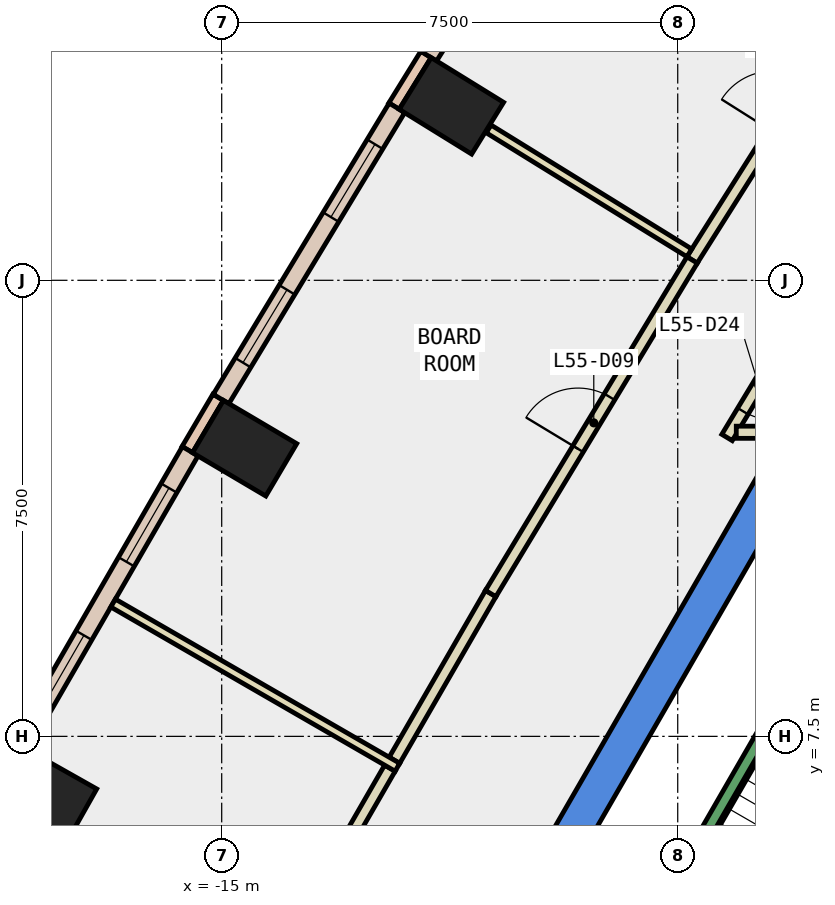
"""IFC4 building model, lengths in metres.
Left out: names, types, materials, properties, quantities, classifications, styles, units other than length and angle.
Written with IfcOpenShell. Run it as: python <this file> out.ifc"""

import sys

from ifc_helpers import new_model, si_unit, direction, frame, frame_2d, origin, origin_2d, place, context, subcontext, project, spatial, polyline, rectangle, outline, extrude, element, fill, save


model = new_model("IFC4")
c1 = context("Model", 3, precision=1e-05, world=origin(), true_north=direction((0.0, 1.0)))
c2 = subcontext(c1, "Body", "Model", "MODEL_VIEW")
j1 = project(units=[si_unit("LENGTHUNIT", "METRE"), si_unit("PLANEANGLEUNIT", "RADIAN")], contexts=[c1])
p1 = place(None, origin())
s1 = spatial("IfcSite", under=j1, at=p1, CompositionType="ELEMENT")
p2 = place(p1, origin())
s2 = spatial("IfcBuilding", under=s1, at=p2, CompositionType="ELEMENT")
p3 = place(p2, frame((0.0, 0.0, 245.0)))
s3 = spatial("IfcBuildingStorey", under=s2, at=p3, CompositionType="ELEMENT", Elevation=245.0)
for number, where, z_axis, x_axis in (
    (1, (-11.222, 17.869, -0.34), (0.0, 0.0, 1.0), (0.526, 0.851, 0.0)),
    (2, (-14.623, 12.239, -0.34), (0.0, 0.0, 1.0), (0.509, 0.861, 0.0)),
    (3, (-17.911, 6.544, -0.34), (0.0, 0.0, 1.0), (0.491, 0.871, 0.0)),
):
    element("IfcColumn", number, at=place(p3, frame(where, z_axis=z_axis, x_axis=x_axis)), inside=s3, PredefinedType="COLUMN", context=c2, shape_type="SweptSolid", body=[
        extrude(rectangle(XDim=1.0, YDim=1.4, at=origin_2d()), origin(), (0.0, 0.0, 1.0), 3.6),
    ])
p4 = place(p3, frame((0.0, 0.0, -0.34)))
e4 = element("IfcWall", 4, at=p4, inside=s3, PredefinedType="SHEAR", context=c2, shape_type="SweptSolid", body=[
    extrude(outline(polyline([(-10.535, 4.253), (-10.015, 3.953), (-5.427, 11.9), (-5.774, 12.5), (-10.535, 4.253)])), origin(), (0.0, 0.0, 1.0), 3.6),
])
p5 = place(p3, frame((-11.64, 18.715, 0.0), z_axis=(0.0, 0.0, 1.0), x_axis=(-0.525825307325, -0.850592585306, 0.0)))
e5 = element("IfcWall", 5, at=p5, inside=s3, PredefinedType="STANDARD", context=c2, shape_type="SweptSolid", body=[
    extrude(rectangle(XDim=1.0, YDim=0.2, at=frame_2d((0.5, 0.0))), origin(), (0.0, 0.0, 1.0), 3.26),
])
p6 = place(p3, frame((-15.058, 13.077, 0.0), z_axis=(0.0, 0.0, 1.0), x_axis=(-0.508087253435, -0.86130560366, 0.0)))
e6 = element("IfcWall", 6, at=p6, inside=s3, PredefinedType="STANDARD", context=c2, shape_type="SweptSolid", body=[
    extrude(rectangle(XDim=1.0, YDim=0.2, at=frame_2d((0.5, 0.0))), origin(), (0.0, 0.0, 1.0), 3.26),
])
p7 = place(p3, frame((-8.618, 23.396, 0.0), z_axis=(0.0, 0.0, 1.0), x_axis=(-0.534088597203, -0.845428512849, 0.0)))
e7 = element("IfcWall", 7, at=p7, inside=s3, PredefinedType="STANDARD", context=c2, shape_type="SweptSolid", body=[
    extrude(rectangle(XDim=5.572, YDim=0.3, at=frame_2d((2.786, 0.0))), origin(), (0.0, 0.0, 1.0), 3.26),
])
p8 = place(p7, frame((0.693, 0.0, 0.9)))
e8 = element("IfcOpeningElement", 8, at=p8, cuts=e7, PredefinedType="OPENING", context=c2, shape_type="SweptSolid", body=[
    extrude(rectangle(XDim=1.4, YDim=2.0, at=frame_2d((0.7, 1.0))), frame((0.0, 0.16, 0.0), z_axis=(0.0, -1.0, 0.0), x_axis=(1.0, 0.0, 0.0)), (0.0, 0.0, 1.0), 0.32),
])
p9 = place(p7, frame((3.479, 0.0, 0.9)))
e9 = element("IfcOpeningElement", 9, at=p9, cuts=e7, PredefinedType="OPENING", context=c2, shape_type="SweptSolid", body=[
    extrude(rectangle(XDim=1.4, YDim=2.0, at=frame_2d((0.7, 1.0))), frame((0.0, 0.16, 0.0), z_axis=(0.0, -1.0, 0.0), x_axis=(1.0, 0.0, 0.0)), (0.0, 0.0, 1.0), 0.32),
])
p10 = place(p3, frame((-12.118, 17.836, 0.0), z_axis=(0.0, 0.0, 1.0), x_axis=(-0.517169592475, -0.855882943293, 0.0)))
e10 = element("IfcWall", 10, at=p10, inside=s3, PredefinedType="STANDARD", context=c2, shape_type="SweptSolid", body=[
    extrude(rectangle(XDim=5.594, YDim=0.3, at=frame_2d((2.797, 0.0))), origin(), (0.0, 0.0, 1.0), 3.26),
])
p11 = place(p10, frame((0.699, 0.0, 0.9)))
e11 = element("IfcOpeningElement", 11, at=p11, cuts=e10, PredefinedType="OPENING", context=c2, shape_type="SweptSolid", body=[
    extrude(rectangle(XDim=1.4, YDim=2.0, at=frame_2d((0.7, 1.0))), frame((0.0, 0.16, 0.0), z_axis=(0.0, -1.0, 0.0), x_axis=(1.0, 0.0, 0.0)), (0.0, 0.0, 1.0), 0.32),
])
p12 = place(p10, frame((3.496, 0.0, 0.9)))
e12 = element("IfcOpeningElement", 12, at=p12, cuts=e10, PredefinedType="OPENING", context=c2, shape_type="SweptSolid", body=[
    extrude(rectangle(XDim=1.4, YDim=2.0, at=frame_2d((0.7, 1.0))), frame((0.0, 0.16, 0.0), z_axis=(0.0, -1.0, 0.0), x_axis=(1.0, 0.0, 0.0)), (0.0, 0.0, 1.0), 0.32),
])
p13 = place(p3, frame((-15.518, 12.189, 0.0), z_axis=(0.0, 0.0, 1.0), x_axis=(-0.49995037644, -0.866054052065, 0.0)))
e13 = element("IfcWall", 13, at=p13, inside=s3, PredefinedType="STANDARD", context=c2, shape_type="SweptSolid", body=[
    extrude(rectangle(XDim=5.594, YDim=0.3, at=frame_2d((2.797, 0.0))), origin(), (0.0, 0.0, 1.0), 3.26),
])
p14 = place(p13, frame((0.699, 0.0, 0.9)))
e14 = element("IfcOpeningElement", 14, at=p14, cuts=e13, PredefinedType="OPENING", context=c2, shape_type="SweptSolid", body=[
    extrude(rectangle(XDim=1.4, YDim=2.0, at=frame_2d((0.7, 1.0))), frame((0.0, 0.16, 0.0), z_axis=(0.0, -1.0, 0.0), x_axis=(1.0, 0.0, 0.0)), (0.0, 0.0, 1.0), 0.32),
])
p15 = place(p13, frame((3.496, 0.0, 0.9)))
e15 = element("IfcOpeningElement", 15, at=p15, cuts=e13, PredefinedType="OPENING", context=c2, shape_type="SweptSolid", body=[
    extrude(rectangle(XDim=1.4, YDim=2.0, at=frame_2d((0.7, 1.0))), frame((0.0, 0.16, 0.0), z_axis=(0.0, -1.0, 0.0), x_axis=(1.0, 0.0, 0.0)), (0.0, 0.0, 1.0), 0.32),
])
p16 = place(p3, frame((-5.65, 14.136, 0.0), z_axis=(0.0, 0.0, 1.0), x_axis=(-0.516869099034, -0.856064445275, 0.0)))
e16 = element("IfcWall", 16, at=p16, inside=s3, PredefinedType="PARTITIONING", context=c2, shape_type="SweptSolid", body=[
    extrude(rectangle(XDim=2.01, YDim=0.2, at=frame_2d((1.005, 0.0))), origin(), (0.0, 0.0, 1.0), 3.26),
])
p17 = place(p16, frame((0.505, 0.0, 0.0)))
e17 = element("IfcOpeningElement", 17, at=p17, cuts=e16, PredefinedType="OPENING", context=c2, shape_type="SweptSolid", body=[
    extrude(rectangle(XDim=1.0, YDim=2.1, at=frame_2d((0.5, 1.05))), frame((0.0, 0.11, 0.0), z_axis=(0.0, -1.0, 0.0), x_axis=(1.0, 0.0, 0.0)), (0.0, 0.0, 1.0), 0.22),
])
p18 = place(p3, frame((-6.537, 12.501, 0.0), z_axis=(0.0, 0.0, 1.0), x_axis=(1.0, 0.0, 0.0)))
e18 = element("IfcWall", 18, at=p18, inside=s3, PredefinedType="PARTITIONING", context=c2, shape_type="SweptSolid", body=[
    extrude(rectangle(XDim=0.766, YDim=0.2, at=frame_2d((0.383, 0.0))), origin(), (0.0, 0.0, 1.0), 3.26),
])
p19 = place(p3, frame((-7.264, 15.335, 0.0), z_axis=(0.0, 0.0, 1.0), x_axis=(0.533989921757, 0.845490841737, 0.0)))
e19 = element("IfcWall", 19, at=p19, inside=s3, PredefinedType="PARTITIONING", context=c2, shape_type="SweptSolid", body=[
    extrude(rectangle(XDim=5.985, YDim=0.2, at=frame_2d((2.992, 0.0))), origin(), (0.0, 0.0, 1.0), 3.26),
])
p20 = place(p19, frame((2.492, 0.0, 0.0)))
e20 = element("IfcOpeningElement", 20, at=p20, cuts=e19, PredefinedType="OPENING", context=c2, shape_type="SweptSolid", body=[
    extrude(rectangle(XDim=1.0, YDim=2.1, at=frame_2d((0.5, 1.05))), frame((0.0, 0.11, 0.0), z_axis=(0.0, -1.0, 0.0), x_axis=(1.0, 0.0, 0.0)), (0.0, 0.0, 1.0), 0.22),
])
p21 = place(p3, frame((-12.159, 7.107, 0.0), z_axis=(0.0, 0.0, 1.0), x_axis=(0.499953838557, 0.866052053466, 0.0)))
e21 = element("IfcWall", 21, at=p21, inside=s3, PredefinedType="PARTITIONING", context=c2, shape_type="SweptSolid", body=[
    extrude(rectangle(XDim=3.166, YDim=0.2, at=frame_2d((1.583, 0.0))), origin(), (0.0, 0.0, 1.0), 3.26),
])
p22 = place(p3, frame((-10.576, 9.849, 0.0), z_axis=(0.0, 0.0, 1.0), x_axis=(0.517026085378, 0.855969641423, 0.0)))
e22 = element("IfcWall", 22, at=p22, inside=s3, PredefinedType="PARTITIONING", context=c2, shape_type="SweptSolid", body=[
    extrude(rectangle(XDim=6.408, YDim=0.2, at=frame_2d((3.204, 0.0))), origin(), (0.0, 0.0, 1.0), 3.26),
])
p23 = place(p22, frame((2.779, 0.0, 0.0)))
e23 = element("IfcOpeningElement", 23, at=p23, cuts=e22, PredefinedType="OPENING", context=c2, shape_type="SweptSolid", body=[
    extrude(rectangle(XDim=1.0, YDim=2.1, at=frame_2d((0.5, 1.05))), frame((0.0, 0.11, 0.0), z_axis=(0.0, -1.0, 0.0), x_axis=(1.0, 0.0, 0.0)), (0.0, 0.0, 1.0), 0.22),
])
p24 = place(p3, frame((-13.817, 4.234, 0.0), z_axis=(0.0, 0.0, 1.0), x_axis=(0.499820325382, 0.866129114125, 0.0)))
e24 = element("IfcWall", 24, at=p24, inside=s3, PredefinedType="PARTITIONING", context=c2, shape_type="SweptSolid", body=[
    extrude(rectangle(XDim=3.167, YDim=0.2, at=frame_2d((1.583, 0.0))), origin(), (0.0, 0.0, 1.0), 3.26),
])
p25 = place(p3, frame((-7.309, 15.451, 0.0), z_axis=(0.0, 0.0, 1.0), x_axis=(-0.850775656528, 0.525529049872, 0.0)))
e25 = element("IfcWall", 25, at=p25, inside=s3, PredefinedType="PARTITIONING", context=c2, shape_type="SweptSolid", body=[
    extrude(rectangle(XDim=3.88, YDim=0.15, at=frame_2d((1.94, 0.0))), origin(), (0.0, 0.0, 1.0), 3.26),
])
p26 = place(p3, frame((-12.11, 6.992, 0.0), z_axis=(0.0, 0.0, 1.0), x_axis=(-0.865994316829, 0.50005384032, 0.0)))
e26 = element("IfcWall", 26, at=p26, inside=s3, PredefinedType="PARTITIONING", context=c2, shape_type="SweptSolid", body=[
    extrude(rectangle(XDim=5.399, YDim=0.15, at=frame_2d((2.7, 0.0))), origin(), (0.0, 0.0, 1.0), 3.26),
])
p27 = place(p3, frame((-5.03, 9.388, 0.0), z_axis=(0.0, 0.0, 1.0), x_axis=(-0.499978703459, -0.866037698999, 0.0)))
e27 = element("IfcWall", 27, at=p27, inside=s3, PredefinedType="STANDARD", context=c2, shape_type="SweptSolid", body=[
    extrude(rectangle(XDim=6.9, YDim=0.2, at=frame_2d((3.45, 0.0))), origin(), (0.0, 0.0, 1.0), 3.26),
])
p28 = place(p11, origin())
e28 = element("IfcWindow", 28, at=p28, inside=s3, PartitioningType="SINGLE_PANEL", PredefinedType="WINDOW", context=c2, shape_type="SweptSolid", body=[
    extrude(rectangle(XDim=1.4, YDim=2.0, at=frame_2d((0.7, 1.0))), frame((0.0, 0.03, 0.0), z_axis=(0.0, -1.0, 0.0), x_axis=(1.0, 0.0, 0.0)), (0.0, 0.0, 1.0), 0.06),
])
fill(e11, e28)
p29 = place(p12, origin())
e29 = element("IfcWindow", 29, at=p29, inside=s3, PartitioningType="SINGLE_PANEL", PredefinedType="WINDOW", context=c2, shape_type="SweptSolid", body=[
    extrude(rectangle(XDim=1.4, YDim=2.0, at=frame_2d((0.7, 1.0))), frame((0.0, 0.03, 0.0), z_axis=(0.0, -1.0, 0.0), x_axis=(1.0, 0.0, 0.0)), (0.0, 0.0, 1.0), 0.06),
])
fill(e12, e29)
p30 = place(p14, origin())
e30 = element("IfcWindow", 30, at=p30, inside=s3, PartitioningType="SINGLE_PANEL", PredefinedType="WINDOW", context=c2, shape_type="SweptSolid", body=[
    extrude(rectangle(XDim=1.4, YDim=2.0, at=frame_2d((0.7, 1.0))), frame((0.0, 0.03, 0.0), z_axis=(0.0, -1.0, 0.0), x_axis=(1.0, 0.0, 0.0)), (0.0, 0.0, 1.0), 0.06),
])
fill(e14, e30)
p31 = place(p15, origin())
e31 = element("IfcWindow", 31, at=p31, inside=s3, PartitioningType="SINGLE_PANEL", PredefinedType="WINDOW", context=c2, shape_type="SweptSolid", body=[
    extrude(rectangle(XDim=1.4, YDim=2.0, at=frame_2d((0.7, 1.0))), frame((0.0, 0.03, 0.0), z_axis=(0.0, -1.0, 0.0), x_axis=(1.0, 0.0, 0.0)), (0.0, 0.0, 1.0), 0.06),
])
fill(e15, e31)
p32 = place(p23, origin())
e32 = element("IfcDoor", 32, at=p32, inside=s3, OperationType="SINGLE_SWING_LEFT", PredefinedType="DOOR", context=c2, shape_type="SweptSolid", body=[
    extrude(rectangle(XDim=1.0, YDim=2.1, at=frame_2d((0.5, 1.05))), frame((0.0, 0.025, 0.0), z_axis=(0.0, -1.0, 0.0), x_axis=(1.0, 0.0, 0.0)), (0.0, 0.0, 1.0), 0.05),
])
fill(e23, e32)
p33 = place(p17, origin())
e33 = element("IfcDoor", 33, at=p33, inside=s3, OperationType="SINGLE_SWING_LEFT", PredefinedType="DOOR", context=c2, shape_type="SweptSolid", body=[
    extrude(rectangle(XDim=1.0, YDim=2.1, at=frame_2d((0.5, 1.05))), frame((0.0, 0.025, 0.0), z_axis=(0.0, -1.0, 0.0), x_axis=(1.0, 0.0, 0.0)), (0.0, 0.0, 1.0), 0.05),
])
fill(e17, e33)
save(model, sys.argv[1])
